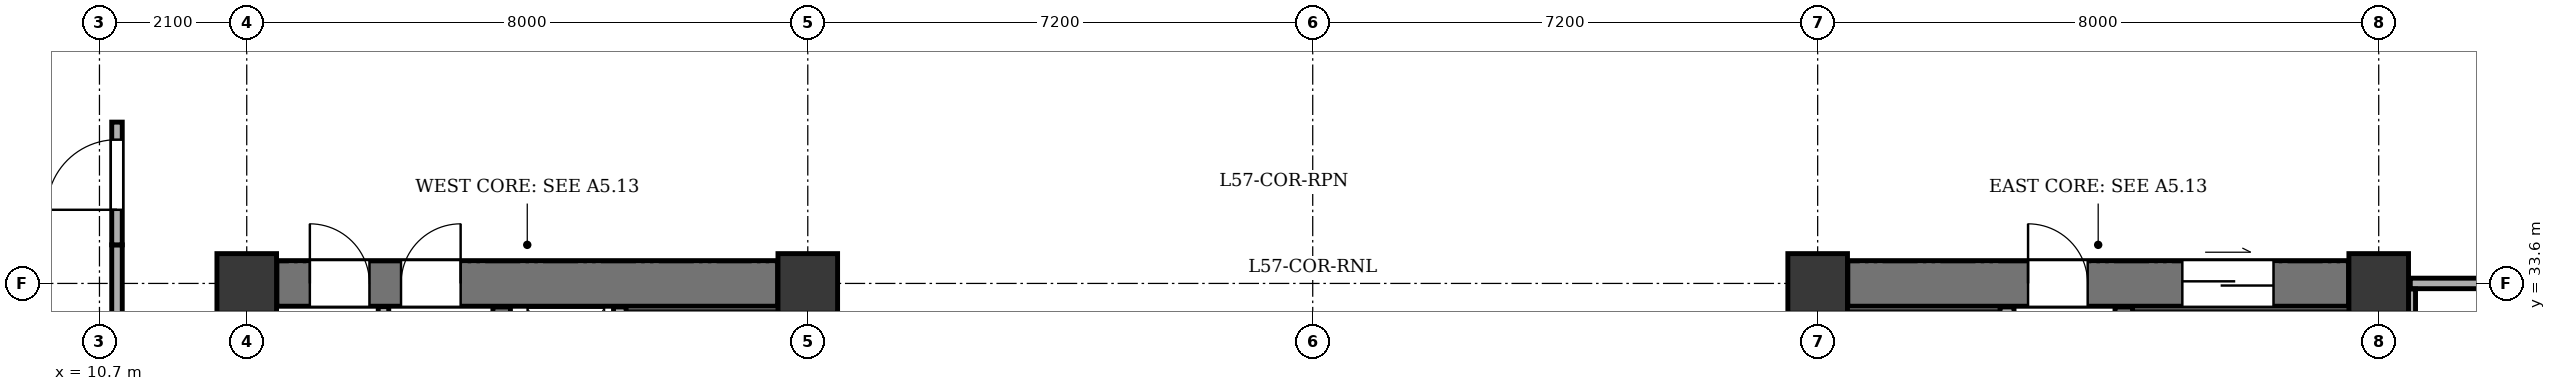
"""IFC4 building model, lengths in metres.
Left out: names, types, materials, properties, quantities, classifications, styles, units other than length and angle.
Written with IfcOpenShell. Run it as: python <this file> out.ifc"""

import sys

from ifc_helpers import new_model, si_unit, direction, frame, frame_2d, origin, origin_2d, place, context, subcontext, project, spatial, rectangle, extrude, element, fill, save


model = new_model("IFC4")
c1 = context("Model", 3, precision=1e-05, world=origin(), true_north=direction((0.0, 1.0)))
c2 = subcontext(c1, "Body", "Model", "MODEL_VIEW")
j1 = project(units=[si_unit("LENGTHUNIT", "METRE"), si_unit("PLANEANGLEUNIT", "RADIAN")], contexts=[c1])
p1 = place(None, origin())
s1 = spatial("IfcSite", under=j1, at=p1, CompositionType="ELEMENT")
p2 = place(p1, origin())
s2 = spatial("IfcBuilding", under=s1, at=p2, CompositionType="ELEMENT")
p3 = place(p2, frame((0.0, 0.0, 221.1)))
s3 = spatial("IfcBuildingStorey", under=s2, at=p3, CompositionType="ELEMENT", Elevation=221.1)
for number, where, z_axis, x_axis in (
    (1, (12.8, 33.6, 0.0), (0.0, 0.0, 1.0), (1.0, 0.0, 0.0)),
    (2, (20.8, 33.6, 0.0), (0.0, 0.0, 1.0), (1.0, 0.0, 0.0)),
    (3, (35.2, 33.6, 0.0), (0.0, 0.0, 1.0), (1.0, 0.0, 0.0)),
    (4, (43.2, 33.6, 0.0), (0.0, 0.0, 1.0), (1.0, 0.0, 0.0)),
):
    element("IfcColumn", number, at=place(p3, frame(where, z_axis=z_axis, x_axis=x_axis)), inside=s3, PredefinedType="COLUMN", context=c2, shape_type="SweptSolid", body=[
        extrude(rectangle(XDim=0.85, YDim=0.85, at=origin_2d()), origin(), (0.0, 0.0, 1.0), 3.4),
    ])
p4 = place(p3, frame((13.23, 33.6, 0.0), z_axis=(0.0, 0.0, 1.0), x_axis=(1.0, 0.0, 0.0)))
e5 = element("IfcWall", 5, at=p4, inside=s3, PredefinedType="SHEAR", context=c2, shape_type="SweptSolid", body=[
    extrude(rectangle(XDim=7.14, YDim=0.65, at=frame_2d((3.57, 0.0))), origin(), (0.0, 0.0, 1.0), 3.1),
])
p5 = place(p4, frame((0.47, 0.0, 0.0)))
e6 = element("IfcOpeningElement", 6, at=p5, cuts=e5, PredefinedType="OPENING", context=c2, shape_type="SweptSolid", body=[
    extrude(rectangle(XDim=0.85, YDim=2.02, at=frame_2d((0.425, 1.01))), frame((0.0, 0.335, 0.0), z_axis=(0.0, -1.0, 0.0), x_axis=(1.0, 0.0, 0.0)), (0.0, 0.0, 1.0), 0.67),
])
p6 = place(p4, frame((1.77, 0.0, 0.0)))
e7 = element("IfcOpeningElement", 7, at=p6, cuts=e5, PredefinedType="OPENING", context=c2, shape_type="SweptSolid", body=[
    extrude(rectangle(XDim=0.85, YDim=2.02, at=frame_2d((0.425, 1.01))), frame((0.0, 0.335, 0.0), z_axis=(0.0, -1.0, 0.0), x_axis=(1.0, 0.0, 0.0)), (0.0, 0.0, 1.0), 0.67),
])
p7 = place(p3, frame((16.435, 21.135, 0.0), z_axis=(0.0, 0.0, 1.0), x_axis=(0.0, 1.0, 0.0)))
e8 = element("IfcWall", 8, at=p7, inside=s3, PredefinedType="SHEAR", context=c2, shape_type="SweptSolid", body=[
    extrude(rectangle(XDim=12.13, YDim=0.25, at=frame_2d((6.065, 0.0))), origin(), (0.0, 0.0, 1.0), 3.1),
])
p8 = place(p7, frame((0.515, 0.0, 0.0)))
e9 = element("IfcOpeningElement", 9, at=p8, cuts=e8, PredefinedType="OPENING", context=c2, shape_type="SweptSolid", body=[
    extrude(rectangle(XDim=1.2, YDim=2.15, at=frame_2d((0.6, 1.075))), frame((0.0, 0.135, 0.0), z_axis=(0.0, -1.0, 0.0), x_axis=(1.0, 0.0, 0.0)), (0.0, 0.0, 1.0), 0.27),
])
p9 = place(p7, frame((2.665, 0.0, 0.0)))
e10 = element("IfcOpeningElement", 10, at=p9, cuts=e8, PredefinedType="OPENING", context=c2, shape_type="SweptSolid", body=[
    extrude(rectangle(XDim=1.15, YDim=2.15, at=frame_2d((0.575, 1.075))), frame((0.0, 0.135, 0.0), z_axis=(0.0, -1.0, 0.0), x_axis=(1.0, 0.0, 0.0)), (0.0, 0.0, 1.0), 0.27),
])
p10 = place(p3, frame((18.12, 31.17, 0.0), z_axis=(0.0, 0.0, 1.0), x_axis=(0.0, 1.0, 0.0)))
e11 = element("IfcWall", 11, at=p10, inside=s3, PredefinedType="PARTITIONING", context=c2, shape_type="SweptSolid", body=[
    extrude(rectangle(XDim=2.095, YDim=0.18, at=frame_2d((1.047, 0.0))), origin(), (0.0, 0.0, 1.0), 3.1),
])
p11 = place(p3, frame((35.63, 33.6, 0.0), z_axis=(0.0, 0.0, 1.0), x_axis=(1.0, 0.0, 0.0)))
e12 = element("IfcWall", 12, at=p11, inside=s3, PredefinedType="SHEAR", context=c2, shape_type="SweptSolid", body=[
    extrude(rectangle(XDim=7.14, YDim=0.65, at=frame_2d((3.57, 0.0))), origin(), (0.0, 0.0, 1.0), 3.1),
])
p12 = place(p11, frame((4.77, 0.0, 0.0)))
e13 = element("IfcOpeningElement", 13, at=p12, cuts=e12, PredefinedType="OPENING", context=c2, shape_type="SweptSolid", body=[
    extrude(rectangle(XDim=1.3, YDim=2.15, at=frame_2d((0.65, 1.075))), frame((0.0, 0.335, 0.0), z_axis=(0.0, -1.0, 0.0), x_axis=(1.0, 0.0, 0.0)), (0.0, 0.0, 1.0), 0.67),
])
p13 = place(p11, frame((2.57, 0.0, 0.0)))
e14 = element("IfcOpeningElement", 14, at=p13, cuts=e12, PredefinedType="OPENING", context=c2, shape_type="SweptSolid", body=[
    extrude(rectangle(XDim=0.85, YDim=2.02, at=frame_2d((0.425, 1.01))), frame((0.0, 0.335, 0.0), z_axis=(0.0, -1.0, 0.0), x_axis=(1.0, 0.0, 0.0)), (0.0, 0.0, 1.0), 0.67),
])
p14 = place(p3, frame((39.565, 21.135, 0.0), z_axis=(0.0, 0.0, 1.0), x_axis=(0.0, 1.0, 0.0)))
e15 = element("IfcWall", 15, at=p14, inside=s3, PredefinedType="SHEAR", context=c2, shape_type="SweptSolid", body=[
    extrude(rectangle(XDim=12.13, YDim=0.25, at=frame_2d((6.065, 0.0))), origin(), (0.0, 0.0, 1.0), 3.1),
])
p15 = place(p14, frame((0.515, 0.0, 0.0)))
e16 = element("IfcOpeningElement", 16, at=p15, cuts=e15, PredefinedType="OPENING", context=c2, shape_type="SweptSolid", body=[
    extrude(rectangle(XDim=1.2, YDim=2.15, at=frame_2d((0.6, 1.075))), frame((0.0, 0.135, 0.0), z_axis=(0.0, -1.0, 0.0), x_axis=(1.0, 0.0, 0.0)), (0.0, 0.0, 1.0), 0.27),
])
p16 = place(p14, frame((2.665, 0.0, 0.0)))
e17 = element("IfcOpeningElement", 17, at=p16, cuts=e15, PredefinedType="OPENING", context=c2, shape_type="SweptSolid", body=[
    extrude(rectangle(XDim=1.15, YDim=2.15, at=frame_2d((0.575, 1.075))), frame((0.0, 0.135, 0.0), z_axis=(0.0, -1.0, 0.0), x_axis=(1.0, 0.0, 0.0)), (0.0, 0.0, 1.0), 0.27),
])
p17 = place(p3, frame((37.9, 25.27, 0.0), z_axis=(0.0, 0.0, 1.0), x_axis=(0.0, 1.0, 0.0)))
e18 = element("IfcWall", 18, at=p17, inside=s3, PredefinedType="SOLIDWALL", context=c2, shape_type="SweptSolid", body=[
    extrude(rectangle(XDim=7.995, YDim=0.2, at=frame_2d((3.998, 0.0))), origin(), (0.0, 0.0, 1.0), 3.1),
])
p18 = place(p3, frame((14.75, 30.96, 0.0), z_axis=(0.0, 0.0, 1.0), x_axis=(0.0, 1.0, 0.0)))
e19 = element("IfcWall", 19, at=p18, inside=s3, PredefinedType="PARTITIONING", context=c2, shape_type="SweptSolid", body=[
    extrude(rectangle(XDim=2.31, YDim=0.15, at=frame_2d((1.155, 0.0))), origin(), (0.0, 0.0, 1.0), 3.1),
])
p19 = place(p18, frame((0.47, 0.0, 0.0)))
e20 = element("IfcOpeningElement", 20, at=p19, cuts=e19, PredefinedType="OPENING", context=c2, shape_type="SweptSolid", body=[
    extrude(rectangle(XDim=0.85, YDim=2.02, at=frame_2d((0.425, 1.01))), frame((0.0, 0.085, 0.0), z_axis=(0.0, -1.0, 0.0), x_axis=(1.0, 0.0, 0.0)), (0.0, 0.0, 1.0), 0.17),
])
p20 = place(p3, frame((10.95, 20.25, 0.0), z_axis=(0.0, 0.0, 1.0), x_axis=(0.0, 1.0, 0.0)))
e21 = element("IfcWall", 21, at=p20, inside=s3, PredefinedType="PARTITIONING", context=c2, shape_type="SweptSolid", body=[
    extrude(rectangle(XDim=13.9, YDim=0.15, at=frame_2d((6.95, 0.0))), origin(), (0.0, 0.0, 1.0), 3.1),
])
p21 = place(p3, frame((10.95, 34.15, 0.0), z_axis=(0.0, 0.0, 1.0), x_axis=(0.0, 1.0, 0.0)))
e22 = element("IfcWall", 22, at=p21, inside=s3, PredefinedType="PARTITIONING", context=c2, shape_type="SweptSolid", body=[
    extrude(rectangle(XDim=1.75, YDim=0.15, at=frame_2d((0.875, 0.0))), origin(), (0.0, 0.0, 1.0), 3.1),
])
p22 = place(p21, frame((0.5, 0.0, 0.0)))
e23 = element("IfcOpeningElement", 23, at=p22, cuts=e22, PredefinedType="OPENING", context=c2, shape_type="SweptSolid", body=[
    extrude(rectangle(XDim=1.0, YDim=2.1, at=frame_2d((0.5, 1.05))), frame((0.0, 0.085, 0.0), z_axis=(0.0, -1.0, 0.0), x_axis=(1.0, 0.0, 0.0)), (0.0, 0.0, 1.0), 0.17),
])
p23 = place(p3, frame((43.65, 33.6, 0.0), z_axis=(0.0, 0.0, 1.0), x_axis=(1.0, 0.0, 0.0)))
e24 = element("IfcWall", 24, at=p23, inside=s3, PredefinedType="PARTITIONING", context=c2, shape_type="SweptSolid", body=[
    extrude(rectangle(XDim=5.305, YDim=0.15, at=frame_2d((2.653, 0.0))), origin(), (0.0, 0.0, 1.0), 2.535),
])
p24 = place(p3, frame((43.65, 20.25, 0.0), z_axis=(0.0, 0.0, 1.0), x_axis=(0.0, 1.0, 0.0)))
e25 = element("IfcWall", 25, at=p24, inside=s3, PredefinedType="PARTITIONING", context=c2, shape_type="SweptSolid", body=[
    extrude(rectangle(XDim=13.27, YDim=0.15, at=frame_2d((6.635, 0.0))), origin(), (0.0, 0.0, 1.0), 3.1),
])
p25 = place(p5, origin())
e26 = element("IfcDoor", 26, at=p25, inside=s3, OperationType="SINGLE_SWING_LEFT", PredefinedType="DOOR", context=c2, shape_type="SweptSolid", body=[
    extrude(rectangle(XDim=0.85, YDim=2.02, at=frame_2d((0.425, 1.01))), frame((0.0, 0.025, 0.0), z_axis=(0.0, -1.0, 0.0), x_axis=(1.0, 0.0, 0.0)), (0.0, 0.0, 1.0), 0.05),
])
fill(e6, e26)
p26 = place(p6, origin())
e27 = element("IfcDoor", 27, at=p26, inside=s3, OperationType="SINGLE_SWING_RIGHT", PredefinedType="DOOR", context=c2, shape_type="SweptSolid", body=[
    extrude(rectangle(XDim=0.85, YDim=2.02, at=frame_2d((0.425, 1.01))), frame((0.0, 0.025, 0.0), z_axis=(0.0, -1.0, 0.0), x_axis=(1.0, 0.0, 0.0)), (0.0, 0.0, 1.0), 0.05),
])
fill(e7, e27)
p27 = place(p12, origin())
e28 = element("IfcDoor", 28, at=p27, inside=s3, OperationType="DOUBLE_DOOR_SLIDING", PredefinedType="DOOR", context=c2, shape_type="SweptSolid", body=[
    extrude(rectangle(XDim=1.3, YDim=2.15, at=frame_2d((0.65, 1.075))), frame((0.0, 0.025, 0.0), z_axis=(0.0, -1.0, 0.0), x_axis=(1.0, 0.0, 0.0)), (0.0, 0.0, 1.0), 0.05),
])
fill(e13, e28)
p28 = place(p13, origin())
e29 = element("IfcDoor", 29, at=p28, inside=s3, OperationType="SINGLE_SWING_LEFT", PredefinedType="DOOR", context=c2, shape_type="SweptSolid", body=[
    extrude(rectangle(XDim=0.85, YDim=2.02, at=frame_2d((0.425, 1.01))), frame((0.0, 0.025, 0.0), z_axis=(0.0, -1.0, 0.0), x_axis=(1.0, 0.0, 0.0)), (0.0, 0.0, 1.0), 0.05),
])
fill(e14, e29)
p29 = place(p22, origin())
e30 = element("IfcDoor", 30, at=p29, inside=s3, OperationType="SINGLE_SWING_LEFT", PredefinedType="DOOR", context=c2, shape_type="SweptSolid", body=[
    extrude(rectangle(XDim=1.0, YDim=2.1, at=frame_2d((0.5, 1.05))), frame((0.0, 0.025, 0.0), z_axis=(0.0, -1.0, 0.0), x_axis=(1.0, 0.0, 0.0)), (0.0, 0.0, 1.0), 0.05),
])
fill(e23, e30)
save(model, sys.argv[1])
